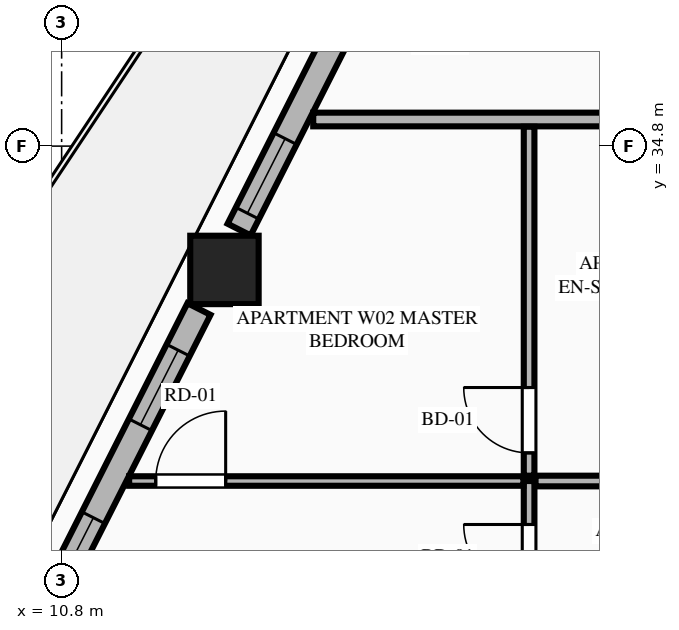
"""IFC4 building model, lengths in metres.
Left out: names, types, materials, properties, quantities, classifications, styles, units other than length and angle.
Written with IfcOpenShell. Run it as: python <this file> out.ifc"""

import sys

from ifc_helpers import new_model, si_unit, direction, frame, frame_2d, origin, origin_2d, place, context, subcontext, project, spatial, rectangle, extrude, element, fill, save


model = new_model("IFC4")
c1 = context("Model", 3, precision=1e-05, world=origin(), true_north=direction((0.0, 1.0)))
c2 = subcontext(c1, "Body", "Model", "MODEL_VIEW")
j1 = project(units=[si_unit("LENGTHUNIT", "METRE"), si_unit("PLANEANGLEUNIT", "RADIAN")], contexts=[c1])
p1 = place(None, origin())
s1 = spatial("IfcSite", under=j1, at=p1, CompositionType="ELEMENT")
p2 = place(p1, origin())
s2 = spatial("IfcBuilding", under=s1, at=p2, CompositionType="ELEMENT")
p3 = place(p2, frame((0.0, 0.0, 186.1)))
s3 = spatial("IfcBuildingStorey", under=s2, at=p3, CompositionType="ELEMENT", Elevation=186.1)
p4 = place(p3, frame((12.942, 33.171, 0.0), z_axis=(0.0, 0.0, 1.0), x_axis=(1.0, 0.0, 0.0)))
e1 = element("IfcColumn", 1, at=p4, inside=s3, PredefinedType="COLUMN", context=c2, shape_type="SweptSolid", body=[
    extrude(rectangle(XDim=0.9, YDim=0.9, at=origin_2d()), origin(), (0.0, 0.0, 1.0), 3.55),
])
p5 = place(p3, frame((15.352, 38.083, 0.0), z_axis=(0.0, 0.0, 1.0), x_axis=(-0.451524246964, -0.89225884944, 0.0)))
e2 = element("IfcWall", 2, at=p5, inside=s3, PredefinedType="STANDARD", context=c2, shape_type="SweptSolid", body=[
    extrude(rectangle(XDim=4.91, YDim=0.34, at=frame_2d((2.455, 0.0))), origin(), (0.0, 0.0, 1.0), 2.883),
])
p6 = place(p5, frame((0.968, 0.0, 0.0)))
e3 = element("IfcOpeningElement", 3, at=p6, cuts=e2, PredefinedType="OPENING", context=c2, shape_type="SweptSolid", body=[
    extrude(rectangle(XDim=1.1, YDim=2.25, at=frame_2d((0.55, 1.125))), frame((0.0, 0.18, 0.0), z_axis=(0.0, -1.0, 0.0), x_axis=(1.0, 0.0, 0.0)), (0.0, 0.0, 1.0), 0.36),
])
p7 = place(p5, frame((3.569, 0.0, 0.75)))
e4 = element("IfcOpeningElement", 4, at=p7, cuts=e2, PredefinedType="OPENING", context=c2, shape_type="SweptSolid", body=[
    extrude(rectangle(XDim=1.1, YDim=1.983, at=frame_2d((0.55, 0.991))), frame((0.0, 0.18, 0.0), z_axis=(0.0, -1.0, 0.0), x_axis=(1.0, 0.0, 0.0)), (0.0, 0.0, 1.0), 0.36),
])
p8 = place(p3, frame((12.607, 32.657, 0.0), z_axis=(0.0, 0.0, 1.0), x_axis=(-0.451426298588, -0.892308409096, 0.0)))
e5 = element("IfcWall", 5, at=p8, inside=s3, PredefinedType="STANDARD", context=c2, shape_type="SweptSolid", body=[
    extrude(rectangle(XDim=4.7, YDim=0.34, at=frame_2d((2.35, 0.0))), origin(), (0.0, 0.0, 1.0), 2.883),
])
p9 = place(p8, frame((0.607, 0.0, 0.75)))
e6 = element("IfcOpeningElement", 6, at=p9, cuts=e5, PredefinedType="OPENING", context=c2, shape_type="SweptSolid", body=[
    extrude(rectangle(XDim=1.1, YDim=1.983, at=frame_2d((0.55, 0.991))), frame((0.0, 0.18, 0.0), z_axis=(0.0, -1.0, 0.0), x_axis=(1.0, 0.0, 0.0)), (0.0, 0.0, 1.0), 0.36),
])
p10 = place(p8, frame((3.077, 0.0, 0.75)))
e7 = element("IfcOpeningElement", 7, at=p10, cuts=e5, PredefinedType="OPENING", context=c2, shape_type="SweptSolid", body=[
    extrude(rectangle(XDim=1.1, YDim=1.983, at=frame_2d((0.55, 0.991))), frame((0.0, 0.18, 0.0), z_axis=(0.0, -1.0, 0.0), x_axis=(1.0, 0.0, 0.0)), (0.0, 0.0, 1.0), 0.36),
])
p11 = place(p3, frame((14.11, 35.15, 0.0), z_axis=(0.0, 0.0, 1.0), x_axis=(1.0, 0.0, 0.0)))
e8 = element("IfcWall", 8, at=p11, inside=s3, PredefinedType="PARTITIONING", context=c2, shape_type="SweptSolid", body=[
    extrude(rectangle(XDim=5.995, YDim=0.18, at=frame_2d((2.998, 0.0))), origin(), (0.0, 0.0, 1.0), 3.35),
])
p12 = place(p3, frame((16.95, 26.994, 0.0), z_axis=(0.0, 0.0, 1.0), x_axis=(0.0, 1.0, 0.0)))
e9 = element("IfcWall", 9, at=p12, inside=s3, PredefinedType="PLUMBINGWALL", context=c2, shape_type="SweptSolid", body=[
    extrude(rectangle(XDim=3.4, YDim=0.14, at=frame_2d((1.7, 0.0))), origin(), (0.0, 0.0, 1.0), 3.35),
])
p13 = place(p12, frame((0.2, 0.0, 0.0)))
e10 = element("IfcOpeningElement", 10, at=p13, cuts=e9, PredefinedType="OPENING", context=c2, shape_type="SweptSolid", body=[
    extrude(rectangle(XDim=0.88, YDim=2.15, at=frame_2d((0.44, 1.075))), frame((0.0, 0.08, 0.0), z_axis=(0.0, -1.0, 0.0), x_axis=(1.0, 0.0, 0.0)), (0.0, 0.0, 1.0), 0.16),
])
p14 = place(p12, frame((1.968, 0.0, 0.0)))
e11 = element("IfcOpeningElement", 11, at=p14, cuts=e9, PredefinedType="OPENING", context=c2, shape_type="SweptSolid", body=[
    extrude(rectangle(XDim=0.86, YDim=2.1, at=frame_2d((0.43, 1.05))), frame((0.0, 0.08, 0.0), z_axis=(0.0, -1.0, 0.0), x_axis=(1.0, 0.0, 0.0)), (0.0, 0.0, 1.0), 0.16),
])
p15 = place(p3, frame((16.95, 30.464, 0.0), z_axis=(0.0, 0.0, 1.0), x_axis=(0.0, 1.0, 0.0)))
e12 = element("IfcWall", 12, at=p15, inside=s3, PredefinedType="PLUMBINGWALL", context=c2, shape_type="SweptSolid", body=[
    extrude(rectangle(XDim=4.591, YDim=0.14, at=frame_2d((2.295, 0.0))), origin(), (0.0, 0.0, 1.0), 3.35),
])
p16 = place(p15, frame((0.3, 0.0, 0.0)))
e13 = element("IfcOpeningElement", 13, at=p16, cuts=e12, PredefinedType="OPENING", context=c2, shape_type="SweptSolid", body=[
    extrude(rectangle(XDim=0.86, YDim=2.1, at=frame_2d((0.43, 1.05))), frame((0.0, 0.08, 0.0), z_axis=(0.0, -1.0, 0.0), x_axis=(1.0, 0.0, 0.0)), (0.0, 0.0, 1.0), 0.16),
])
p17 = place(p3, frame((17.035, 30.394, 0.0), z_axis=(0.0, 0.0, 1.0), x_axis=(1.0, 0.0, 0.0)))
e14 = element("IfcWall", 14, at=p17, inside=s3, PredefinedType="PLUMBINGWALL", context=c2, shape_type="SweptSolid", body=[
    extrude(rectangle(XDim=3.28, YDim=0.14, at=frame_2d((1.64, 0.0))), origin(), (0.0, 0.0, 1.0), 3.35),
])
p18 = place(p3, frame((11.688, 30.394, 0.0), z_axis=(0.0, 0.0, 1.0), x_axis=(1.0, 0.0, 0.0)))
e15 = element("IfcWall", 15, at=p18, inside=s3, PredefinedType="PARTITIONING", context=c2, shape_type="SweptSolid", body=[
    extrude(rectangle(XDim=5.187, YDim=0.125, at=frame_2d((2.594, 0.0))), origin(), (0.0, 0.0, 1.0), 3.35),
])
p19 = place(p18, frame((0.35, 0.0, 0.0)))
e16 = element("IfcOpeningElement", 16, at=p19, cuts=e15, PredefinedType="OPENING", context=c2, shape_type="SweptSolid", body=[
    extrude(rectangle(XDim=0.92, YDim=2.15, at=frame_2d((0.46, 1.075))), frame((0.0, 0.073, 0.0), z_axis=(0.0, -1.0, 0.0), x_axis=(1.0, 0.0, 0.0)), (0.0, 0.0, 1.0), 0.145),
])
p20 = place(p9, origin())
e17 = element("IfcWindow", 17, at=p20, inside=s3, PartitioningType="SINGLE_PANEL", PredefinedType="WINDOW", context=c2, shape_type="SweptSolid", body=[
    extrude(rectangle(XDim=1.1, YDim=1.983, at=frame_2d((0.55, 0.991))), frame((0.0, 0.03, 0.0), z_axis=(0.0, -1.0, 0.0), x_axis=(1.0, 0.0, 0.0)), (0.0, 0.0, 1.0), 0.06),
])
fill(e6, e17)
p21 = place(p14, origin())
e18 = element("IfcDoor", 18, at=p21, inside=s3, OperationType="SINGLE_SWING_RIGHT", PredefinedType="DOOR", context=c2, shape_type="SweptSolid", body=[
    extrude(rectangle(XDim=0.86, YDim=2.1, at=frame_2d((0.43, 1.05))), frame((0.0, 0.025, 0.0), z_axis=(0.0, -1.0, 0.0), x_axis=(1.0, 0.0, 0.0)), (0.0, 0.0, 1.0), 0.05),
])
fill(e11, e18)
p22 = place(p16, origin())
e19 = element("IfcDoor", 19, at=p22, inside=s3, OperationType="SINGLE_SWING_RIGHT", PredefinedType="DOOR", context=c2, shape_type="SweptSolid", body=[
    extrude(rectangle(XDim=0.86, YDim=2.1, at=frame_2d((0.43, 1.05))), frame((0.0, 0.025, 0.0), z_axis=(0.0, -1.0, 0.0), x_axis=(1.0, 0.0, 0.0)), (0.0, 0.0, 1.0), 0.05),
])
fill(e13, e19)
p23 = place(p19, origin())
e20 = element("IfcDoor", 20, at=p23, inside=s3, OperationType="SINGLE_SWING_RIGHT", PredefinedType="DOOR", context=c2, shape_type="SweptSolid", body=[
    extrude(rectangle(XDim=0.92, YDim=2.15, at=frame_2d((0.46, 1.075))), frame((0.0, 0.025, 0.0), z_axis=(0.0, -1.0, 0.0), x_axis=(1.0, 0.0, 0.0)), (0.0, 0.0, 1.0), 0.05),
])
fill(e16, e20)
p24 = place(p7, origin())
e21 = element("IfcWindow", 21, at=p24, inside=s3, PartitioningType="SINGLE_PANEL", PredefinedType="WINDOW", context=c2, shape_type="SweptSolid", body=[
    extrude(rectangle(XDim=1.1, YDim=1.983, at=frame_2d((0.55, 0.991))), frame((0.0, 0.03, 0.0), z_axis=(0.0, -1.0, 0.0), x_axis=(1.0, 0.0, 0.0)), (0.0, 0.0, 1.0), 0.06),
])
fill(e4, e21)
p25 = place(p10, origin())
e22 = element("IfcWindow", 22, at=p25, inside=s3, PartitioningType="SINGLE_PANEL", PredefinedType="WINDOW", context=c2, shape_type="SweptSolid", body=[
    extrude(rectangle(XDim=1.1, YDim=1.983, at=frame_2d((0.55, 0.991))), frame((0.0, 0.03, 0.0), z_axis=(0.0, -1.0, 0.0), x_axis=(1.0, 0.0, 0.0)), (0.0, 0.0, 1.0), 0.06),
])
fill(e7, e22)
save(model, sys.argv[1])
